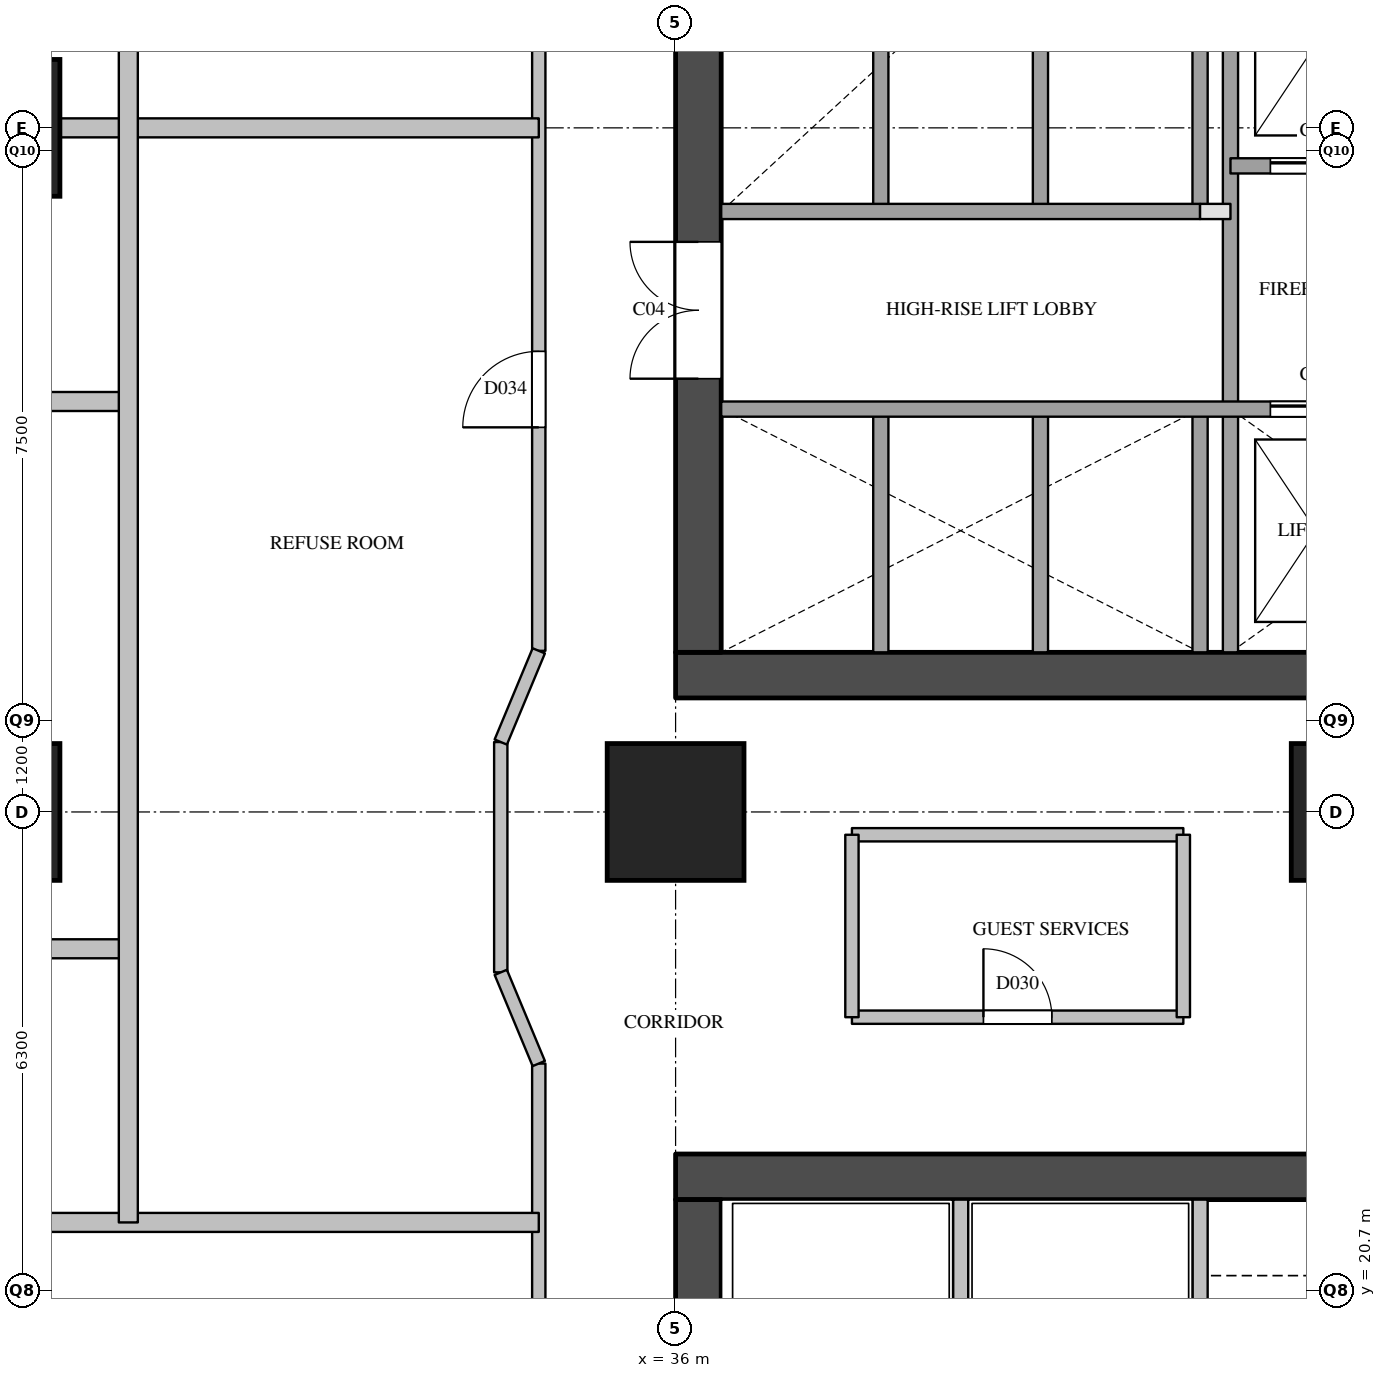
"""IFC4 building model, lengths in metres.
Left out: names, types, materials, properties, quantities, classifications, styles, units other than length and angle.
Written with IfcOpenShell. Run it as: python <this file> out.ifc"""

import sys

from ifc_helpers import new_model, si_unit, direction, frame, frame_2d, origin, origin_2d, place, context, subcontext, project, spatial, rectangle, extrude, element, fill, save


model = new_model("IFC4")
c1 = context("Model", 3, precision=1e-05, world=origin(), true_north=direction((0.0, 1.0)))
c2 = subcontext(c1, "Body", "Model", "MODEL_VIEW")
j1 = project(units=[si_unit("LENGTHUNIT", "METRE"), si_unit("PLANEANGLEUNIT", "RADIAN")], contexts=[c1])
p1 = place(None, origin())
s1 = spatial("IfcSite", under=j1, at=p1, CompositionType="ELEMENT")
p2 = place(p1, origin())
s2 = spatial("IfcBuilding", under=s1, at=p2, CompositionType="ELEMENT")
p3 = place(p2, frame((0.0, 0.0, 57.6)))
s3 = spatial("IfcBuildingStorey", under=s2, at=p3, CompositionType="ELEMENT", Elevation=57.6)
for number, where, z_axis, x_axis in (
    (1, (27.0, 27.0, 0.0), (0.0, 0.0, 1.0), (1.0, 0.0, 0.0)),
    (2, (27.0, 36.0, 0.0), (0.0, 0.0, 1.0), (1.0, 0.0, 0.0)),
    (3, (36.0, 27.0, 0.0), (0.0, 0.0, 1.0), (1.0, 0.0, 0.0)),
    (4, (45.0, 27.0, 0.0), (0.0, 0.0, 1.0), (1.0, 0.0, 0.0)),
):
    element("IfcColumn", number, at=place(p3, frame(where, z_axis=z_axis, x_axis=x_axis)), inside=s3, PredefinedType="COLUMN", context=c2, shape_type="SweptSolid", body=[
        extrude(rectangle(XDim=1.8, YDim=1.8, at=origin_2d()), origin(), (0.0, 0.0, 1.0), 3.8),
    ])
p4 = place(p3, frame((36.0, 28.8, 0.0), z_axis=(0.0, 0.0, 1.0), x_axis=(1.0, 0.0, 0.0)))
e5 = element("IfcWall", 5, at=p4, inside=s3, PredefinedType="SHEAR", context=c2, shape_type="SweptSolid", body=[
    extrude(rectangle(XDim=12.4, YDim=0.6, at=frame_2d((6.2, 0.0))), origin(), (0.0, 0.0, 1.0), 3.5),
])
p5 = place(p3, frame((36.3, 29.1, 0.0), z_axis=(0.0, 0.0, 1.0), x_axis=(0.0, 1.0, 0.0)))
e6 = element("IfcWall", 6, at=p5, inside=s3, PredefinedType="SHEAR", context=c2, shape_type="SweptSolid", body=[
    extrude(rectangle(XDim=20.3, YDim=0.6, at=frame_2d((10.15, 0.0))), origin(), (0.0, 0.0, 1.0), 3.5),
])
p6 = place(p5, frame((3.6, 0.0, 0.0)))
e7 = element("IfcOpeningElement", 7, at=p6, cuts=e6, PredefinedType="OPENING", context=c2, shape_type="SweptSolid", body=[
    extrude(rectangle(XDim=1.8, YDim=2.1, at=frame_2d((0.9, 1.05))), frame((0.0, 0.31, 0.0), z_axis=(0.0, -1.0, 0.0), x_axis=(1.0, 0.0, 0.0)), (0.0, 0.0, 1.0), 0.62),
])
p7 = place(p5, frame((16.4, 0.0, 0.0)))
e8 = element("IfcOpeningElement", 8, at=p7, cuts=e6, PredefinedType="OPENING", context=c2, shape_type="SweptSolid", body=[
    extrude(rectangle(XDim=1.0, YDim=2.1, at=frame_2d((0.5, 1.05))), frame((0.0, 0.31, 0.0), z_axis=(0.0, -1.0, 0.0), x_axis=(1.0, 0.0, 0.0)), (0.0, 0.0, 1.0), 0.62),
])
p8 = place(p3, frame((38.7, 29.1, 0.0), z_axis=(0.0, 0.0, 1.0), x_axis=(0.0, 1.0, 0.0)))
e9 = element("IfcWall", 9, at=p8, inside=s3, PredefinedType="SOLIDWALL", context=c2, shape_type="SweptSolid", body=[
    extrude(rectangle(XDim=3.2, YDim=0.2, at=frame_2d((1.6, 0.0))), origin(), (0.0, 0.0, 1.0), 3.5),
])
p9 = place(p3, frame((38.7, 34.9, 0.0), z_axis=(0.0, 0.0, 1.0), x_axis=(0.0, 1.0, 0.0)))
e10 = element("IfcWall", 10, at=p9, inside=s3, PredefinedType="SOLIDWALL", context=c2, shape_type="SweptSolid", body=[
    extrude(rectangle(XDim=3.2, YDim=0.2, at=frame_2d((1.6, 0.0))), origin(), (0.0, 0.0, 1.0), 3.5),
])
p10 = place(p3, frame((40.8, 29.1, 0.0), z_axis=(0.0, 0.0, 1.0), x_axis=(0.0, 1.0, 0.0)))
e11 = element("IfcWall", 11, at=p10, inside=s3, PredefinedType="SOLIDWALL", context=c2, shape_type="SweptSolid", body=[
    extrude(rectangle(XDim=3.2, YDim=0.2, at=frame_2d((1.6, 0.0))), origin(), (0.0, 0.0, 1.0), 3.5),
])
p11 = place(p3, frame((40.8, 34.9, 0.0), z_axis=(0.0, 0.0, 1.0), x_axis=(0.0, 1.0, 0.0)))
e12 = element("IfcWall", 12, at=p11, inside=s3, PredefinedType="SOLIDWALL", context=c2, shape_type="SweptSolid", body=[
    extrude(rectangle(XDim=3.2, YDim=0.2, at=frame_2d((1.6, 0.0))), origin(), (0.0, 0.0, 1.0), 3.5),
])
p12 = place(p3, frame((42.9, 29.1, 0.0), z_axis=(0.0, 0.0, 1.0), x_axis=(0.0, 1.0, 0.0)))
e13 = element("IfcWall", 13, at=p12, inside=s3, PredefinedType="SOLIDWALL", context=c2, shape_type="SweptSolid", body=[
    extrude(rectangle(XDim=3.2, YDim=0.2, at=frame_2d((1.6, 0.0))), origin(), (0.0, 0.0, 1.0), 3.5),
])
p13 = place(p3, frame((42.9, 34.9, 0.0), z_axis=(0.0, 0.0, 1.0), x_axis=(0.0, 1.0, 0.0)))
e14 = element("IfcWall", 14, at=p13, inside=s3, PredefinedType="SOLIDWALL", context=c2, shape_type="SweptSolid", body=[
    extrude(rectangle(XDim=3.2, YDim=0.2, at=frame_2d((1.6, 0.0))), origin(), (0.0, 0.0, 1.0), 3.5),
])
p14 = place(p3, frame((43.3, 29.1, 0.0), z_axis=(0.0, 0.0, 1.0), x_axis=(0.0, 1.0, 0.0)))
e15 = element("IfcWall", 15, at=p14, inside=s3, PredefinedType="SOLIDWALL", context=c2, shape_type="SweptSolid", body=[
    extrude(rectangle(XDim=9.9, YDim=0.2, at=frame_2d((4.95, 0.0))), origin(), (0.0, 0.0, 1.0), 3.5),
])
p15 = place(p3, frame((36.6, 32.3, 0.0), z_axis=(0.0, 0.0, 1.0), x_axis=(1.0, 0.0, 0.0)))
e16 = element("IfcWall", 16, at=p15, inside=s3, PredefinedType="SOLIDWALL", context=c2, shape_type="SweptSolid", body=[
    extrude(rectangle(XDim=11.2, YDim=0.2, at=frame_2d((5.6, 0.0))), origin(), (0.0, 0.0, 1.0), 3.5),
])
p16 = place(p15, frame((7.225, 0.0, 0.0)))
e17 = element("IfcOpeningElement", 17, at=p16, cuts=e16, PredefinedType="OPENING", context=c2, shape_type="SweptSolid", body=[
    extrude(rectangle(XDim=1.2, YDim=2.1, at=frame_2d((0.6, 1.05))), frame((0.0, 0.11, 0.0), z_axis=(0.0, -1.0, 0.0), x_axis=(1.0, 0.0, 0.0)), (0.0, 0.0, 1.0), 0.22),
])
p17 = place(p15, frame((9.475, 0.0, 0.0)))
e18 = element("IfcOpeningElement", 18, at=p17, cuts=e16, PredefinedType="OPENING", context=c2, shape_type="SweptSolid", body=[
    extrude(rectangle(XDim=1.2, YDim=2.1, at=frame_2d((0.6, 1.05))), frame((0.0, 0.11, 0.0), z_axis=(0.0, -1.0, 0.0), x_axis=(1.0, 0.0, 0.0)), (0.0, 0.0, 1.0), 0.22),
])
p18 = place(p3, frame((42.9, 34.9, 0.0), z_axis=(0.0, 0.0, 1.0), x_axis=(1.0, 0.0, 0.0)))
e19 = element("IfcWall", 19, at=p18, inside=s3, PredefinedType="PARTITIONING", context=c2, shape_type="SweptSolid", body=[
    extrude(rectangle(XDim=0.4, YDim=0.2, at=frame_2d((0.2, 0.0))), origin(), (0.0, 0.0, 1.0), 3.5),
])
p19 = place(p3, frame((36.6, 34.9, 0.0), z_axis=(0.0, 0.0, 1.0), x_axis=(1.0, 0.0, 0.0)))
e20 = element("IfcWall", 20, at=p19, inside=s3, PredefinedType="SOLIDWALL", context=c2, shape_type="SweptSolid", body=[
    extrude(rectangle(XDim=6.3, YDim=0.2, at=frame_2d((3.15, 0.0))), origin(), (0.0, 0.0, 1.0), 3.5),
])
p20 = place(p3, frame((43.3, 35.5, 0.0), z_axis=(0.0, 0.0, 1.0), x_axis=(1.0, 0.0, 0.0)))
e21 = element("IfcWall", 21, at=p20, inside=s3, PredefinedType="SOLIDWALL", context=c2, shape_type="SweptSolid", body=[
    extrude(rectangle(XDim=4.5, YDim=0.2, at=frame_2d((2.25, 0.0))), origin(), (0.0, 0.0, 1.0), 3.5),
])
p21 = place(p20, frame((0.525, 0.0, 0.0)))
e22 = element("IfcOpeningElement", 22, at=p21, cuts=e21, PredefinedType="OPENING", context=c2, shape_type="SweptSolid", body=[
    extrude(rectangle(XDim=1.2, YDim=2.1, at=frame_2d((0.6, 1.05))), frame((0.0, 0.11, 0.0), z_axis=(0.0, -1.0, 0.0), x_axis=(1.0, 0.0, 0.0)), (0.0, 0.0, 1.0), 0.22),
])
p22 = place(p20, frame((3.025, 0.0, 0.0)))
e23 = element("IfcOpeningElement", 23, at=p22, cuts=e21, PredefinedType="OPENING", context=c2, shape_type="SweptSolid", body=[
    extrude(rectangle(XDim=0.7, YDim=2.1, at=frame_2d((0.35, 1.05))), frame((0.0, 0.11, 0.0), z_axis=(0.0, -1.0, 0.0), x_axis=(1.0, 0.0, 0.0)), (0.0, 0.0, 1.0), 0.22),
])
p23 = place(p3, frame((36.0, 22.2, 0.0), z_axis=(0.0, 0.0, 1.0), x_axis=(1.0, 0.0, 0.0)))
e24 = element("IfcWall", 24, at=p23, inside=s3, PredefinedType="SHEAR", context=c2, shape_type="SweptSolid", body=[
    extrude(rectangle(XDim=9.0, YDim=0.6, at=frame_2d((4.5, 0.0))), origin(), (0.0, 0.0, 1.0), 3.5),
])
p24 = place(p3, frame((36.3, 9.6, 0.0), z_axis=(0.0, 0.0, 1.0), x_axis=(0.0, 1.0, 0.0)))
e25 = element("IfcWall", 25, at=p24, inside=s3, PredefinedType="SHEAR", context=c2, shape_type="SweptSolid", body=[
    extrude(rectangle(XDim=12.3, YDim=0.6, at=frame_2d((6.15, 0.0))), origin(), (0.0, 0.0, 1.0), 3.5),
])
p25 = place(p24, frame((0.525, 0.0, 0.0)))
e26 = element("IfcOpeningElement", 26, at=p25, cuts=e25, PredefinedType="OPENING", context=c2, shape_type="SweptSolid", body=[
    extrude(rectangle(XDim=1.2, YDim=2.1, at=frame_2d((0.6, 1.05))), frame((0.0, 0.31, 0.0), z_axis=(0.0, -1.0, 0.0), x_axis=(1.0, 0.0, 0.0)), (0.0, 0.0, 1.0), 0.62),
])
p26 = place(p24, frame((4.8, 0.0, 0.0)))
e27 = element("IfcOpeningElement", 27, at=p26, cuts=e25, PredefinedType="OPENING", context=c2, shape_type="SweptSolid", body=[
    extrude(rectangle(XDim=1.0, YDim=2.1, at=frame_2d((0.5, 1.05))), frame((0.0, 0.31, 0.0), z_axis=(0.0, -1.0, 0.0), x_axis=(1.0, 0.0, 0.0)), (0.0, 0.0, 1.0), 0.62),
])
for number, where, z_axis, x_axis in (
    (28, (39.75, 20.0, 0.0), (0.0, 0.0, 1.0), (0.0, 1.0, 0.0)),
    (29, (42.9, 20.0, 0.0), (0.0, 0.0, 1.0), (0.0, 1.0, 0.0)),
):
    element("IfcWall", number, at=place(p3, frame(where, z_axis=z_axis, x_axis=x_axis)), inside=s3, PredefinedType="SOLIDWALL", context=c2, shape_type="SweptSolid", body=[
        extrude(rectangle(XDim=1.9, YDim=0.2, at=frame_2d((0.95, 0.0))), origin(), (0.0, 0.0, 1.0), 3.5),
    ])
p27 = place(p3, frame((38.32, 24.3, 0.0), z_axis=(0.0, 0.0, 1.0), x_axis=(1.0, 0.0, 0.0)))
e30 = element("IfcWall", 30, at=p27, inside=s3, PredefinedType="PARTITIONING", context=c2, shape_type="SweptSolid", body=[
    extrude(rectangle(XDim=4.36, YDim=0.175, at=frame_2d((2.18, 0.0))), origin(), (0.0, 0.0, 1.0), 3.5),
])
p28 = place(p27, frame((1.73, 0.0, 0.0)))
e31 = element("IfcOpeningElement", 31, at=p28, cuts=e30, PredefinedType="OPENING", context=c2, shape_type="SweptSolid", body=[
    extrude(rectangle(XDim=0.9, YDim=2.1, at=frame_2d((0.45, 1.05))), frame((0.0, 0.097, 0.0), z_axis=(0.0, -1.0, 0.0), x_axis=(1.0, 0.0, 0.0)), (0.0, 0.0, 1.0), 0.195),
])
p29 = place(p3, frame((38.32, 26.7, 0.0), z_axis=(0.0, 0.0, 1.0), x_axis=(1.0, 0.0, 0.0)))
e32 = element("IfcWall", 32, at=p29, inside=s3, PredefinedType="PARTITIONING", context=c2, shape_type="SweptSolid", body=[
    extrude(rectangle(XDim=4.36, YDim=0.175, at=frame_2d((2.18, 0.0))), origin(), (0.0, 0.0, 1.0), 2.5),
])
p30 = place(p3, frame((33.7, 24.89, 0.0), z_axis=(0.0, 0.0, 1.0), x_axis=(0.0, 1.0, 0.0)))
e33 = element("IfcWall", 33, at=p30, inside=s3, PredefinedType="PARTITIONING", context=c2, shape_type="SweptSolid", body=[
    extrude(rectangle(XDim=3.03, YDim=0.175, at=frame_2d((1.515, 0.0))), origin(), (0.0, 0.0, 1.0), 2.5),
])
p31 = place(p3, frame((34.2, 7.2, 0.0), z_axis=(0.0, 0.0, 1.0), x_axis=(0.0, 1.0, 0.0)))
e34 = element("IfcWall", 34, at=p31, inside=s3, PredefinedType="PARTITIONING", context=c2, shape_type="SweptSolid", body=[
    extrude(rectangle(XDim=16.49, YDim=0.175, at=frame_2d((8.245, 0.0))), origin(), (0.0, 0.0, 1.0), 3.5),
])
p32 = place(p31, frame((1.3, 0.0, 0.0)))
e35 = element("IfcOpeningElement", 35, at=p32, cuts=e34, PredefinedType="OPENING", context=c2, shape_type="SweptSolid", body=[
    extrude(rectangle(XDim=1.0, YDim=2.1, at=frame_2d((0.5, 1.05))), frame((0.0, 0.097, 0.0), z_axis=(0.0, -1.0, 0.0), x_axis=(1.0, 0.0, 0.0)), (0.0, 0.0, 1.0), 0.195),
])
p33 = place(p31, frame((6.7, 0.0, 0.0)))
e36 = element("IfcOpeningElement", 36, at=p33, cuts=e34, PredefinedType="OPENING", context=c2, shape_type="SweptSolid", body=[
    extrude(rectangle(XDim=1.0, YDim=2.1, at=frame_2d((0.5, 1.05))), frame((0.0, 0.097, 0.0), z_axis=(0.0, -1.0, 0.0), x_axis=(1.0, 0.0, 0.0)), (0.0, 0.0, 1.0), 0.195),
])
p34 = place(p31, frame((12.1, 0.0, 0.0)))
e37 = element("IfcOpeningElement", 37, at=p34, cuts=e34, PredefinedType="OPENING", context=c2, shape_type="SweptSolid", body=[
    extrude(rectangle(XDim=1.0, YDim=2.1, at=frame_2d((0.5, 1.05))), frame((0.0, 0.097, 0.0), z_axis=(0.0, -1.0, 0.0), x_axis=(1.0, 0.0, 0.0)), (0.0, 0.0, 1.0), 0.195),
])
p35 = place(p3, frame((34.2, 29.12, 0.0), z_axis=(0.0, 0.0, 1.0), x_axis=(0.0, 1.0, 0.0)))
e38 = element("IfcWall", 38, at=p35, inside=s3, PredefinedType="PARTITIONING", context=c2, shape_type="SweptSolid", body=[
    extrude(rectangle(XDim=22.68, YDim=0.175, at=frame_2d((11.34, 0.0))), origin(), (0.0, 0.0, 1.0), 3.5),
])
p36 = place(p35, frame((2.94, 0.0, 0.0)))
e39 = element("IfcOpeningElement", 39, at=p36, cuts=e38, PredefinedType="OPENING", context=c2, shape_type="SweptSolid", body=[
    extrude(rectangle(XDim=1.0, YDim=2.1, at=frame_2d((0.5, 1.05))), frame((0.0, 0.097, 0.0), z_axis=(0.0, -1.0, 0.0), x_axis=(1.0, 0.0, 0.0)), (0.0, 0.0, 1.0), 0.195),
])
p37 = place(p35, frame((9.98, 0.0, 0.0)))
e40 = element("IfcOpeningElement", 40, at=p37, cuts=e38, PredefinedType="OPENING", context=c2, shape_type="SweptSolid", body=[
    extrude(rectangle(XDim=1.0, YDim=2.1, at=frame_2d((0.5, 1.05))), frame((0.0, 0.097, 0.0), z_axis=(0.0, -1.0, 0.0), x_axis=(1.0, 0.0, 0.0)), (0.0, 0.0, 1.0), 0.195),
])
p38 = place(p35, frame((17.93, 0.0, 0.0)))
e41 = element("IfcOpeningElement", 41, at=p38, cuts=e38, PredefinedType="OPENING", context=c2, shape_type="SweptSolid", body=[
    extrude(rectangle(XDim=0.9, YDim=2.1, at=frame_2d((0.45, 1.05))), frame((0.0, 0.097, 0.0), z_axis=(0.0, -1.0, 0.0), x_axis=(1.0, 0.0, 0.0)), (0.0, 0.0, 1.0), 0.195),
])
for number, where, z_axis, x_axis in (
    (42, (38.32, 24.3, 0.0), (0.0, 0.0, 1.0), (0.0, 1.0, 0.0)),
    (43, (42.68, 24.3, 0.0), (0.0, 0.0, 1.0), (0.0, 1.0, 0.0)),
):
    element("IfcWall", number, at=place(p3, frame(where, z_axis=z_axis, x_axis=x_axis)), inside=s3, PredefinedType="PARTITIONING", context=c2, shape_type="SweptSolid", body=[
        extrude(rectangle(XDim=2.4, YDim=0.175, at=frame_2d((1.2, 0.0))), origin(), (0.0, 0.0, 1.0), 2.5),
    ])
p39 = place(p3, frame((19.8, 21.6, 0.0), z_axis=(0.0, 0.0, 1.0), x_axis=(1.0, 0.0, 0.0)))
e44 = element("IfcWall", 44, at=p39, inside=s3, PredefinedType="PARTITIONING", context=c2, shape_type="SweptSolid", body=[
    extrude(rectangle(XDim=14.4, YDim=0.25, at=frame_2d((7.2, 0.0))), origin(), (0.0, 0.0, 1.0), 2.5),
])
p40 = place(p3, frame((20.3, 25.2, 0.0), z_axis=(0.0, 0.0, 1.0), x_axis=(1.0, 0.0, 0.0)))
e45 = element("IfcWall", 45, at=p40, inside=s3, PredefinedType="PARTITIONING", context=c2, shape_type="SweptSolid", body=[
    extrude(rectangle(XDim=8.5, YDim=0.25, at=frame_2d((4.25, 0.0))), origin(), (0.0, 0.0, 1.0), 2.5),
])
p41 = place(p3, frame((19.8, 32.4, 0.0), z_axis=(0.0, 0.0, 1.0), x_axis=(1.0, 0.0, 0.0)))
e46 = element("IfcWall", 46, at=p41, inside=s3, PredefinedType="PARTITIONING", context=c2, shape_type="SweptSolid", body=[
    extrude(rectangle(XDim=9.0, YDim=0.25, at=frame_2d((4.5, 0.0))), origin(), (0.0, 0.0, 1.0), 2.5),
])
p42 = place(p3, frame((19.8, 36.0, 0.0), z_axis=(0.0, 0.0, 1.0), x_axis=(1.0, 0.0, 0.0)))
e47 = element("IfcWall", 47, at=p42, inside=s3, PredefinedType="PARTITIONING", context=c2, shape_type="SweptSolid", body=[
    extrude(rectangle(XDim=14.4, YDim=0.25, at=frame_2d((7.2, 0.0))), origin(), (0.0, 0.0, 1.0), 3.5),
])
p43 = place(p3, frame((28.8, 21.6, 0.0), z_axis=(0.0, 0.0, 1.0), x_axis=(0.0, 1.0, 0.0)))
e48 = element("IfcWall", 48, at=p43, inside=s3, PredefinedType="PARTITIONING", context=c2, shape_type="SweptSolid", body=[
    extrude(rectangle(XDim=32.4, YDim=0.25, at=frame_2d((16.2, 0.0))), origin(), (0.0, 0.0, 1.0), 2.5),
])
p44 = place(p3, frame((34.2, 23.69, 0.0), z_axis=(0.0, 0.0, 1.0), x_axis=(-0.384628719983, 0.923071366561, 0.0)))
e49 = element("IfcWall", 49, at=p44, inside=s3, PredefinedType="PARTITIONING", context=c2, shape_type="SweptSolid", body=[
    extrude(rectangle(XDim=1.3, YDim=0.175, at=frame_2d((0.65, 0.0))), origin(), (0.0, 0.0, 1.0), 3.5),
])
p45 = place(p3, frame((33.7, 27.92, 0.0), z_axis=(0.0, 0.0, 1.0), x_axis=(0.384562051588, 0.923099143363, 0.0)))
e50 = element("IfcWall", 50, at=p45, inside=s3, PredefinedType="PARTITIONING", context=c2, shape_type="SweptSolid", body=[
    extrude(rectangle(XDim=1.3, YDim=0.175, at=frame_2d((0.65, 0.0))), origin(), (0.0, 0.0, 1.0), 3.5),
])
p46 = place(p16, origin())
e51 = element("IfcDoor", 51, at=p46, inside=s3, OperationType="SLIDING_TO_LEFT", PredefinedType="DOOR", context=c2, shape_type="SweptSolid", body=[
    extrude(rectangle(XDim=1.2, YDim=2.1, at=frame_2d((0.6, 1.05))), frame((0.0, 0.025, 0.0), z_axis=(0.0, -1.0, 0.0), x_axis=(1.0, 0.0, 0.0)), (0.0, 0.0, 1.0), 0.05),
])
fill(e17, e51)
p47 = place(p21, origin())
e52 = element("IfcDoor", 52, at=p47, inside=s3, OperationType="SLIDING_TO_LEFT", PredefinedType="DOOR", context=c2, shape_type="SweptSolid", body=[
    extrude(rectangle(XDim=1.2, YDim=2.1, at=frame_2d((0.6, 1.05))), frame((0.0, 0.025, 0.0), z_axis=(0.0, -1.0, 0.0), x_axis=(1.0, 0.0, 0.0)), (0.0, 0.0, 1.0), 0.05),
])
fill(e22, e52)
p48 = place(p6, origin())
e53 = element("IfcDoor", 53, at=p48, inside=s3, OperationType="DOUBLE_DOOR_SINGLE_SWING", PredefinedType="DOOR", context=c2, shape_type="SweptSolid", body=[
    extrude(rectangle(XDim=1.8, YDim=2.1, at=frame_2d((0.9, 1.05))), frame((0.0, 0.025, 0.0), z_axis=(0.0, -1.0, 0.0), x_axis=(1.0, 0.0, 0.0)), (0.0, 0.0, 1.0), 0.05),
])
fill(e7, e53)
p49 = place(p28, origin())
e54 = element("IfcDoor", 54, at=p49, inside=s3, OperationType="SINGLE_SWING_LEFT", PredefinedType="DOOR", context=c2, shape_type="SweptSolid", body=[
    extrude(rectangle(XDim=0.9, YDim=2.1, at=frame_2d((0.45, 1.05))), frame((0.0, 0.025, 0.0), z_axis=(0.0, -1.0, 0.0), x_axis=(1.0, 0.0, 0.0)), (0.0, 0.0, 1.0), 0.05),
])
fill(e31, e54)
p50 = place(p36, origin())
e55 = element("IfcDoor", 55, at=p50, inside=s3, OperationType="SINGLE_SWING_LEFT", PredefinedType="DOOR", context=c2, shape_type="SweptSolid", body=[
    extrude(rectangle(XDim=1.0, YDim=2.1, at=frame_2d((0.5, 1.05))), frame((0.0, 0.025, 0.0), z_axis=(0.0, -1.0, 0.0), x_axis=(1.0, 0.0, 0.0)), (0.0, 0.0, 1.0), 0.05),
])
fill(e39, e55)
save(model, sys.argv[1])
